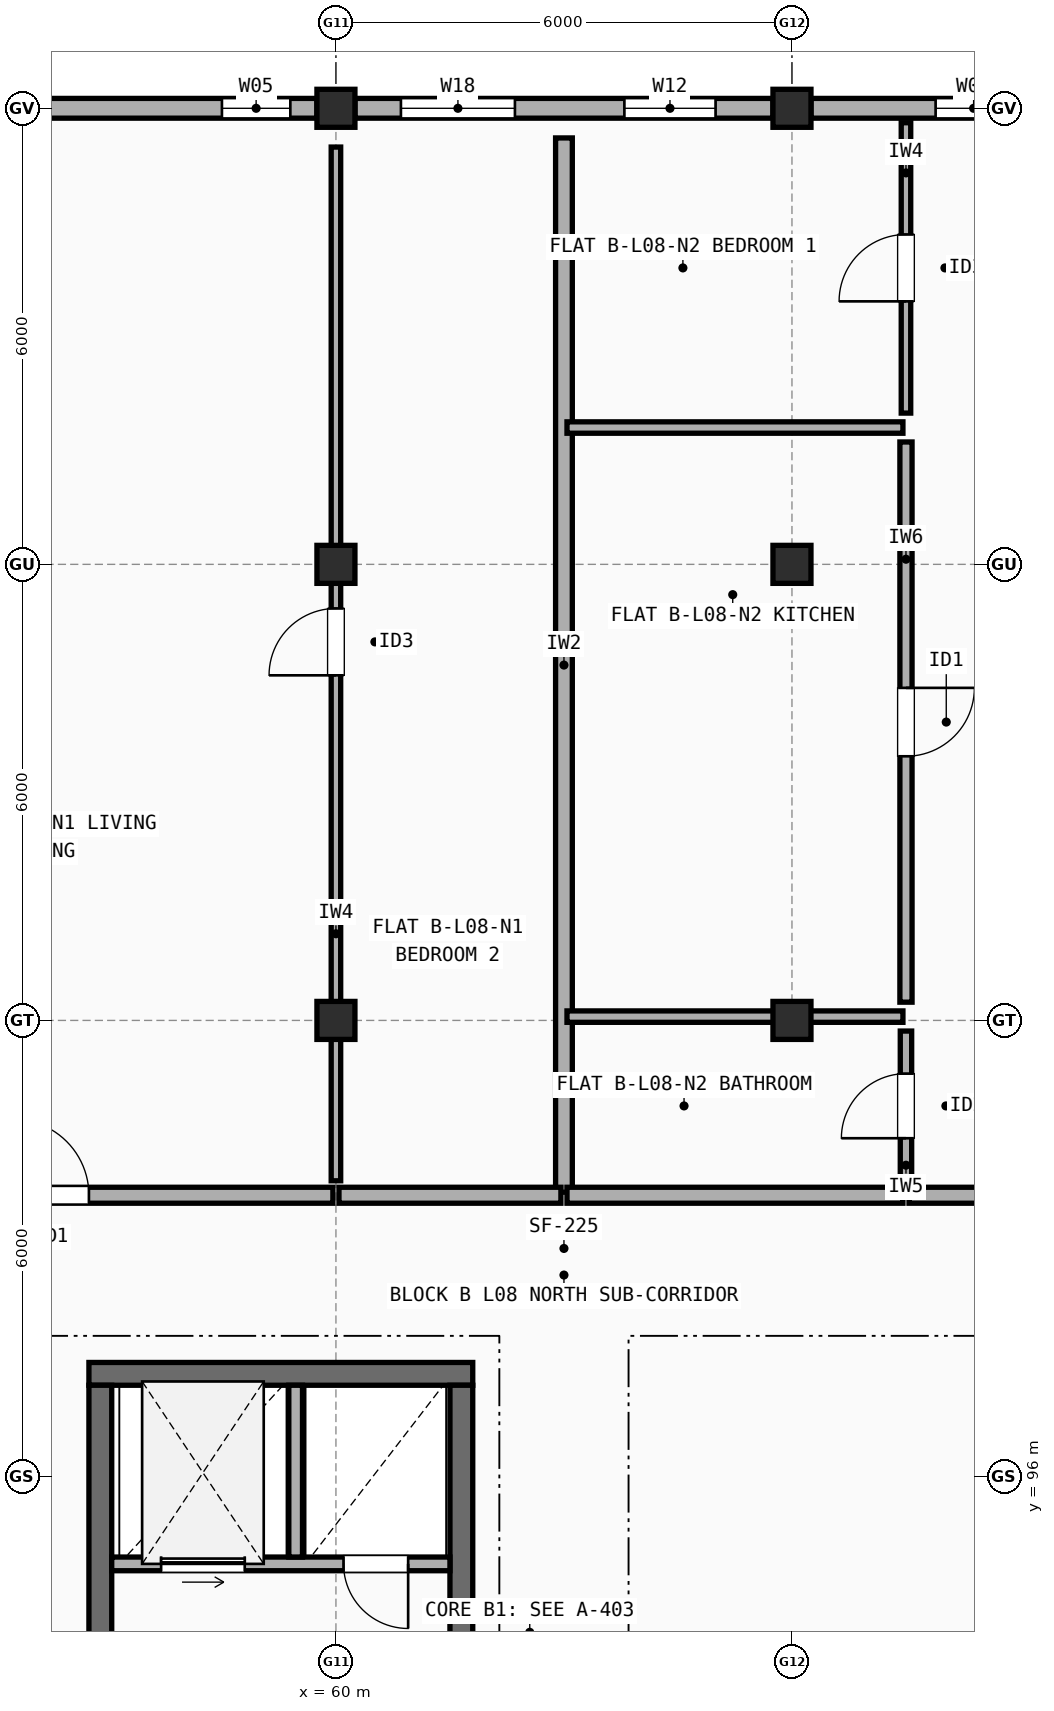
"""IFC4 building model, lengths in metres.
Left out: names, types, materials, properties, quantities, classifications, styles, units other than length and angle.
Written with IfcOpenShell. Run it as: python <this file> out.ifc"""

import sys

from ifc_helpers import new_model, si_unit, direction, frame, frame_2d, origin, origin_2d, place, context, subcontext, project, spatial, rectangle, extrude, element, fill, save


model = new_model("IFC4")
c1 = context("Model", 3, precision=1e-05, world=origin(), true_north=direction((0.0, 1.0)))
c2 = subcontext(c1, "Body", "Model", "MODEL_VIEW")
j1 = project(units=[si_unit("LENGTHUNIT", "METRE"), si_unit("PLANEANGLEUNIT", "RADIAN")], contexts=[c1])
p1 = place(None, origin())
s1 = spatial("IfcSite", under=j1, at=p1, CompositionType="ELEMENT")
p2 = place(p1, origin())
s2 = spatial("IfcBuilding", under=s1, at=p2, CompositionType="ELEMENT")
p3 = place(p2, frame((0.0, 0.0, 26.9)))
s3 = spatial("IfcBuildingStorey", under=s2, at=p3, CompositionType="ELEMENT", Elevation=26.9)
for number, where, z_axis, x_axis in (
    (1, (60.0, 102.0, 0.0), (0.0, 0.0, 1.0), (1.0, 0.0, 0.0)),
    (2, (60.0, 108.0, 0.0), (0.0, 0.0, 1.0), (1.0, 0.0, 0.0)),
    (3, (60.0, 114.0, 0.0), (0.0, 0.0, 1.0), (1.0, 0.0, 0.0)),
    (4, (66.0, 102.0, 0.0), (0.0, 0.0, 1.0), (1.0, 0.0, 0.0)),
    (5, (66.0, 108.0, 0.0), (0.0, 0.0, 1.0), (1.0, 0.0, 0.0)),
    (6, (66.0, 114.0, 0.0), (0.0, 0.0, 1.0), (1.0, 0.0, 0.0)),
):
    element("IfcColumn", number, at=place(p3, frame(where, z_axis=z_axis, x_axis=x_axis)), inside=s3, PredefinedType="COLUMN", context=c2, shape_type="SweptSolid", body=[
        extrude(rectangle(XDim=0.5, YDim=0.5, at=origin_2d()), origin(), (0.0, 0.0, 1.0), 2.98),
    ])
p4 = place(p3, frame((71.75, 114.0, 0.0), z_axis=(0.0, 0.0, 1.0), x_axis=(-1.0, 0.0, 0.0)))
e7 = element("IfcWall", 7, at=p4, inside=s3, PredefinedType="STANDARD", context=c2, shape_type="SweptSolid", body=[
    extrude(rectangle(XDim=5.5, YDim=0.26, at=frame_2d((2.75, 0.0))), origin(), (0.0, 0.0, 1.0), 2.462),
])
p5 = place(p4, frame((0.35, 0.0, 0.9)))
e8 = element("IfcOpeningElement", 8, at=p5, cuts=e7, PredefinedType="OPENING", context=c2, shape_type="SweptSolid", body=[
    extrude(rectangle(XDim=1.0, YDim=1.4, at=frame_2d((0.5, 0.7))), frame((0.0, 0.14, 0.0), z_axis=(0.0, -1.0, 0.0), x_axis=(1.0, 0.0, 0.0)), (0.0, 0.0, 1.0), 0.28),
])
p6 = place(p4, frame((2.86, 0.0, 0.9)))
e9 = element("IfcOpeningElement", 9, at=p6, cuts=e7, PredefinedType="OPENING", context=c2, shape_type="SweptSolid", body=[
    extrude(rectangle(XDim=1.0, YDim=1.4, at=frame_2d((0.5, 0.7))), frame((0.0, 0.14, 0.0), z_axis=(0.0, -1.0, 0.0), x_axis=(1.0, 0.0, 0.0)), (0.0, 0.0, 1.0), 0.28),
])
p7 = place(p3, frame((65.75, 114.0, 0.0), z_axis=(0.0, 0.0, 1.0), x_axis=(-1.0, 0.0, 0.0)))
e10 = element("IfcWall", 10, at=p7, inside=s3, PredefinedType="STANDARD", context=c2, shape_type="SweptSolid", body=[
    extrude(rectangle(XDim=5.5, YDim=0.26, at=frame_2d((2.75, 0.0))), origin(), (0.0, 0.0, 1.0), 2.462),
])
p8 = place(p7, frame((0.755, 0.0, 0.9)))
e11 = element("IfcOpeningElement", 11, at=p8, cuts=e10, PredefinedType="OPENING", context=c2, shape_type="SweptSolid", body=[
    extrude(rectangle(XDim=1.2, YDim=1.35, at=frame_2d((0.6, 0.675))), frame((0.0, 0.14, 0.0), z_axis=(0.0, -1.0, 0.0), x_axis=(1.0, 0.0, 0.0)), (0.0, 0.0, 1.0), 0.28),
])
p9 = place(p7, frame((3.395, 0.0, 0.9)))
e12 = element("IfcOpeningElement", 12, at=p9, cuts=e10, PredefinedType="OPENING", context=c2, shape_type="SweptSolid", body=[
    extrude(rectangle(XDim=1.5, YDim=1.4, at=frame_2d((0.75, 0.7))), frame((0.0, 0.14, 0.0), z_axis=(0.0, -1.0, 0.0), x_axis=(1.0, 0.0, 0.0)), (0.0, 0.0, 1.0), 0.28),
])
p10 = place(p3, frame((59.75, 114.0, 0.0), z_axis=(0.0, 0.0, 1.0), x_axis=(-1.0, 0.0, 0.0)))
e13 = element("IfcWall", 13, at=p10, inside=s3, PredefinedType="STANDARD", context=c2, shape_type="SweptSolid", body=[
    extrude(rectangle(XDim=5.5, YDim=0.26, at=frame_2d((2.75, 0.0))), origin(), (0.0, 0.0, 1.0), 2.462),
])
p11 = place(p10, frame((0.35, 0.0, 0.9)))
e14 = element("IfcOpeningElement", 14, at=p11, cuts=e13, PredefinedType="OPENING", context=c2, shape_type="SweptSolid", body=[
    extrude(rectangle(XDim=0.9, YDim=1.4, at=frame_2d((0.45, 0.7))), frame((0.0, 0.14, 0.0), z_axis=(0.0, -1.0, 0.0), x_axis=(1.0, 0.0, 0.0)), (0.0, 0.0, 1.0), 0.28),
])
p12 = place(p10, frame((4.25, 0.0, 0.9)))
e15 = element("IfcOpeningElement", 15, at=p12, cuts=e13, PredefinedType="OPENING", context=c2, shape_type="SweptSolid", body=[
    extrude(rectangle(XDim=0.9, YDim=1.4, at=frame_2d((0.45, 0.7))), frame((0.0, 0.14, 0.0), z_axis=(0.0, -1.0, 0.0), x_axis=(1.0, 0.0, 0.0)), (0.0, 0.0, 1.0), 0.28),
])
p13 = place(p3, frame((61.8, 97.35, 0.0), z_axis=(0.0, 0.0, 1.0), x_axis=(-1.0, 0.0, 0.0)))
e16 = element("IfcWall", 16, at=p13, inside=s3, PredefinedType="SHEAR", context=c2, shape_type="SweptSolid", body=[
    extrude(rectangle(XDim=5.05, YDim=0.3, at=frame_2d((2.525, 0.0))), origin(), (0.0, 0.0, 1.0), 2.98),
])
p14 = place(p3, frame((61.65, 90.75, 0.0), z_axis=(0.0, 0.0, 1.0), x_axis=(0.0, 1.0, 0.0)))
e17 = element("IfcWall", 17, at=p14, inside=s3, PredefinedType="SHEAR", context=c2, shape_type="SweptSolid", body=[
    extrude(rectangle(XDim=6.45, YDim=0.3, at=frame_2d((3.225, 0.0))), origin(), (0.0, 0.0, 1.0), 2.98),
])
p15 = place(p3, frame((56.9, 93.75, 0.0), z_axis=(0.0, 0.0, 1.0), x_axis=(0.0, 1.0, 0.0)))
e18 = element("IfcWall", 18, at=p15, inside=s3, PredefinedType="SHEAR", context=c2, shape_type="SweptSolid", body=[
    extrude(rectangle(XDim=3.45, YDim=0.3, at=frame_2d((1.725, 0.0))), origin(), (0.0, 0.0, 1.0), 2.98),
])
p16 = place(p3, frame((57.05, 94.85, 0.0), z_axis=(0.0, 0.0, 1.0), x_axis=(1.0, 0.0, 0.0)))
e19 = element("IfcWall", 19, at=p16, inside=s3, PredefinedType="SOLIDWALL", context=c2, shape_type="SweptSolid", body=[
    extrude(rectangle(XDim=4.45, YDim=0.18, at=frame_2d((2.225, 0.0))), origin(), (0.0, 0.0, 1.0), 2.98),
])
p17 = place(p16, frame((0.65, 0.0, 0.0)))
e20 = element("IfcOpeningElement", 20, at=p17, cuts=e19, PredefinedType="OPENING", context=c2, shape_type="SweptSolid", body=[
    extrude(rectangle(XDim=1.1, YDim=2.15, at=frame_2d((0.55, 1.075))), frame((0.0, 0.1, 0.0), z_axis=(0.0, -1.0, 0.0), x_axis=(1.0, 0.0, 0.0)), (0.0, 0.0, 1.0), 0.2),
])
p18 = place(p16, frame((3.05, 0.0, 0.0)))
e21 = element("IfcOpeningElement", 21, at=p18, cuts=e19, PredefinedType="OPENING", context=c2, shape_type="SweptSolid", body=[
    extrude(rectangle(XDim=0.85, YDim=2.1, at=frame_2d((0.425, 1.05))), frame((0.0, 0.1, 0.0), z_axis=(0.0, -1.0, 0.0), x_axis=(1.0, 0.0, 0.0)), (0.0, 0.0, 1.0), 0.2),
])
p19 = place(p3, frame((59.47, 94.94, 0.0), z_axis=(0.0, 0.0, 1.0), x_axis=(0.0, 1.0, 0.0)))
e22 = element("IfcWall", 22, at=p19, inside=s3, PredefinedType="SOLIDWALL", context=c2, shape_type="SweptSolid", body=[
    extrude(rectangle(XDim=2.26, YDim=0.18, at=frame_2d((1.13, 0.0))), origin(), (0.0, 0.0, 1.0), 2.98),
])
p20 = place(p3, frame((63.0, 99.74, 0.0), z_axis=(0.0, 0.0, 1.0), x_axis=(0.0, 1.0, 0.0)))
e23 = element("IfcWall", 23, at=p20, inside=s3, PredefinedType="SOLIDWALL", context=c2, shape_type="SweptSolid", body=[
    extrude(rectangle(XDim=13.87, YDim=0.22, at=frame_2d((6.935, 0.0))), origin(), (0.0, 0.0, 1.0), 2.462),
])
p21 = place(p3, frame((52.54, 99.7, 0.0), z_axis=(0.0, 0.0, 1.0), x_axis=(1.0, 0.0, 0.0)))
e24 = element("IfcWall", 24, at=p21, inside=s3, PredefinedType="SOLIDWALL", context=c2, shape_type="SweptSolid", body=[
    extrude(rectangle(XDim=7.42, YDim=0.21, at=frame_2d((3.71, 0.0))), origin(), (0.0, 0.0, 1.0), 2.508),
])
p22 = place(p21, frame((3.21, 0.0, 0.0)))
e25 = element("IfcOpeningElement", 25, at=p22, cuts=e24, PredefinedType="OPENING", context=c2, shape_type="SweptSolid", body=[
    extrude(rectangle(XDim=1.0, YDim=2.15, at=frame_2d((0.5, 1.075))), frame((0.0, 0.115, 0.0), z_axis=(0.0, -1.0, 0.0), x_axis=(1.0, 0.0, 0.0)), (0.0, 0.0, 1.0), 0.23),
])
p23 = place(p3, frame((60.04, 99.7, 0.0), z_axis=(0.0, 0.0, 1.0), x_axis=(1.0, 0.0, 0.0)))
e26 = element("IfcWall", 26, at=p23, inside=s3, PredefinedType="SOLIDWALL", context=c2, shape_type="SweptSolid", body=[
    extrude(rectangle(XDim=2.92, YDim=0.21, at=frame_2d((1.46, 0.0))), origin(), (0.0, 0.0, 1.0), 2.508),
])
p24 = place(p3, frame((60.0, 99.89, 0.0), z_axis=(0.0, 0.0, 1.0), x_axis=(0.0, 1.0, 0.0)))
e27 = element("IfcWall", 27, at=p24, inside=s3, PredefinedType="PARTITIONING", context=c2, shape_type="SweptSolid", body=[
    extrude(rectangle(XDim=13.6, YDim=0.125, at=frame_2d((6.8, 0.0))), origin(), (0.0, 0.0, 1.0), 2.458),
])
p25 = place(p24, frame((6.65, 0.0, 0.0)))
e28 = element("IfcOpeningElement", 28, at=p25, cuts=e27, PredefinedType="OPENING", context=c2, shape_type="SweptSolid", body=[
    extrude(rectangle(XDim=0.88, YDim=2.1, at=frame_2d((0.44, 1.05))), frame((0.0, 0.073, 0.0), z_axis=(0.0, -1.0, 0.0), x_axis=(1.0, 0.0, 0.0)), (0.0, 0.0, 1.0), 0.145),
])
p26 = place(p3, frame((63.04, 99.7, 0.0), z_axis=(0.0, 0.0, 1.0), x_axis=(1.0, 0.0, 0.0)))
e29 = element("IfcWall", 29, at=p26, inside=s3, PredefinedType="SOLIDWALL", context=c2, shape_type="SweptSolid", body=[
    extrude(rectangle(XDim=4.42, YDim=0.21, at=frame_2d((2.21, 0.0))), origin(), (0.0, 0.0, 1.0), 2.98),
])
p27 = place(p3, frame((67.54, 99.7, 0.0), z_axis=(0.0, 0.0, 1.0), x_axis=(1.0, 0.0, 0.0)))
e30 = element("IfcWall", 30, at=p27, inside=s3, PredefinedType="SOLIDWALL", context=c2, shape_type="SweptSolid", body=[
    extrude(rectangle(XDim=7.42, YDim=0.21, at=frame_2d((3.71, 0.0))), origin(), (0.0, 0.0, 1.0), 2.98),
])
p28 = place(p27, frame((3.185, 0.0, 0.0)))
e31 = element("IfcOpeningElement", 31, at=p28, cuts=e30, PredefinedType="OPENING", context=c2, shape_type="SweptSolid", body=[
    extrude(rectangle(XDim=1.05, YDim=2.15, at=frame_2d((0.525, 1.075))), frame((0.0, 0.115, 0.0), z_axis=(0.0, -1.0, 0.0), x_axis=(1.0, 0.0, 0.0)), (0.0, 0.0, 1.0), 0.23),
])
p29 = place(p3, frame((67.5, 109.99, 0.0), z_axis=(0.0, 0.0, 1.0), x_axis=(0.0, 1.0, 0.0)))
e32 = element("IfcWall", 32, at=p29, inside=s3, PredefinedType="PARTITIONING", context=c2, shape_type="SweptSolid", body=[
    extrude(rectangle(XDim=3.82, YDim=0.125, at=frame_2d((1.91, 0.0))), origin(), (0.0, 0.0, 1.0), 2.98),
])
p30 = place(p29, frame((1.47, 0.0, 0.0)))
e33 = element("IfcOpeningElement", 33, at=p30, cuts=e32, PredefinedType="OPENING", context=c2, shape_type="SweptSolid", body=[
    extrude(rectangle(XDim=0.88, YDim=2.1, at=frame_2d((0.44, 1.05))), frame((0.0, 0.073, 0.0), z_axis=(0.0, -1.0, 0.0), x_axis=(1.0, 0.0, 0.0)), (0.0, 0.0, 1.0), 0.145),
])
p31 = place(p3, frame((67.5, 102.24, 0.0), z_axis=(0.0, 0.0, 1.0), x_axis=(0.0, 1.0, 0.0)))
e34 = element("IfcWall", 34, at=p31, inside=s3, PredefinedType="PLUMBINGWALL", context=c2, shape_type="SweptSolid", body=[
    extrude(rectangle(XDim=7.37, YDim=0.16, at=frame_2d((3.685, 0.0))), origin(), (0.0, 0.0, 1.0), 2.462),
])
p32 = place(p31, frame((3.235, 0.0, 0.0)))
e35 = element("IfcOpeningElement", 35, at=p32, cuts=e34, PredefinedType="OPENING", context=c2, shape_type="SweptSolid", body=[
    extrude(rectangle(XDim=0.9, YDim=2.1, at=frame_2d((0.45, 1.05))), frame((0.0, 0.09, 0.0), z_axis=(0.0, -1.0, 0.0), x_axis=(1.0, 0.0, 0.0)), (0.0, 0.0, 1.0), 0.18),
])
p33 = place(p3, frame((67.5, 99.89, 0.0), z_axis=(0.0, 0.0, 1.0), x_axis=(0.0, 1.0, 0.0)))
e36 = element("IfcWall", 36, at=p33, inside=s3, PredefinedType="PARTITIONING", context=c2, shape_type="SweptSolid", body=[
    extrude(rectangle(XDim=1.97, YDim=0.15, at=frame_2d((0.985, 0.0))), origin(), (0.0, 0.0, 1.0), 2.98),
])
p34 = place(p33, frame((0.56, 0.0, 0.0)))
e37 = element("IfcOpeningElement", 37, at=p34, cuts=e36, PredefinedType="OPENING", context=c2, shape_type="SweptSolid", body=[
    extrude(rectangle(XDim=0.85, YDim=2.1, at=frame_2d((0.425, 1.05))), frame((0.0, 0.085, 0.0), z_axis=(0.0, -1.0, 0.0), x_axis=(1.0, 0.0, 0.0)), (0.0, 0.0, 1.0), 0.17),
])
p35 = place(p3, frame((63.04, 109.8, 0.0), z_axis=(0.0, 0.0, 1.0), x_axis=(1.0, 0.0, 0.0)))
e38 = element("IfcWall", 38, at=p35, inside=s3, PredefinedType="PARTITIONING", context=c2, shape_type="SweptSolid", body=[
    extrude(rectangle(XDim=4.42, YDim=0.15, at=frame_2d((2.21, 0.0))), origin(), (0.0, 0.0, 1.0), 2.548),
])
p36 = place(p3, frame((63.04, 102.05, 0.0), z_axis=(0.0, 0.0, 1.0), x_axis=(1.0, 0.0, 0.0)))
e39 = element("IfcWall", 39, at=p36, inside=s3, PredefinedType="PARTITIONING", context=c2, shape_type="SweptSolid", body=[
    extrude(rectangle(XDim=4.42, YDim=0.15, at=frame_2d((2.21, 0.0))), origin(), (0.0, 0.0, 1.0), 2.462),
])
p37 = place(p6, origin())
e40 = element("IfcWindow", 40, at=p37, inside=s3, PartitioningType="SINGLE_PANEL", PredefinedType="WINDOW", context=c2, shape_type="SweptSolid", body=[
    extrude(rectangle(XDim=1.0, YDim=1.4, at=frame_2d((0.5, 0.7))), frame((0.0, 0.03, 0.0), z_axis=(0.0, -1.0, 0.0), x_axis=(1.0, 0.0, 0.0)), (0.0, 0.0, 1.0), 0.06),
])
fill(e9, e40)
p38 = place(p8, origin())
e41 = element("IfcWindow", 41, at=p38, inside=s3, PartitioningType="SINGLE_PANEL", PredefinedType="WINDOW", context=c2, shape_type="SweptSolid", body=[
    extrude(rectangle(XDim=1.2, YDim=1.35, at=frame_2d((0.6, 0.675))), frame((0.0, 0.03, 0.0), z_axis=(0.0, -1.0, 0.0), x_axis=(1.0, 0.0, 0.0)), (0.0, 0.0, 1.0), 0.06),
])
fill(e11, e41)
p39 = place(p9, origin())
e42 = element("IfcWindow", 42, at=p39, inside=s3, PartitioningType="SINGLE_PANEL", PredefinedType="WINDOW", context=c2, shape_type="SweptSolid", body=[
    extrude(rectangle(XDim=1.5, YDim=1.4, at=frame_2d((0.75, 0.7))), frame((0.0, 0.03, 0.0), z_axis=(0.0, -1.0, 0.0), x_axis=(1.0, 0.0, 0.0)), (0.0, 0.0, 1.0), 0.06),
])
fill(e12, e42)
p40 = place(p11, origin())
e43 = element("IfcWindow", 43, at=p40, inside=s3, PartitioningType="SINGLE_PANEL", PredefinedType="WINDOW", context=c2, shape_type="SweptSolid", body=[
    extrude(rectangle(XDim=0.9, YDim=1.4, at=frame_2d((0.45, 0.7))), frame((0.0, 0.03, 0.0), z_axis=(0.0, -1.0, 0.0), x_axis=(1.0, 0.0, 0.0)), (0.0, 0.0, 1.0), 0.06),
])
fill(e14, e43)
p41 = place(p17, origin())
e44 = element("IfcDoor", 44, at=p41, inside=s3, OperationType="SLIDING_TO_LEFT", PredefinedType="DOOR", context=c2, shape_type="SweptSolid", body=[
    extrude(rectangle(XDim=1.1, YDim=2.15, at=frame_2d((0.55, 1.075))), frame((0.0, 0.025, 0.0), z_axis=(0.0, -1.0, 0.0), x_axis=(1.0, 0.0, 0.0)), (0.0, 0.0, 1.0), 0.05),
])
fill(e20, e44)
p42 = place(p18, frame((0.85, 0.0, 0.0), z_axis=(0.0, 0.0, 1.0), x_axis=(-1.0, 0.0, 0.0)))
e45 = element("IfcDoor", 45, at=p42, inside=s3, OperationType="SINGLE_SWING_RIGHT", PredefinedType="DOOR", context=c2, shape_type="SweptSolid", body=[
    extrude(rectangle(XDim=0.85, YDim=2.1, at=frame_2d((0.425, 1.05))), frame((0.0, 0.025, 0.0), z_axis=(0.0, -1.0, 0.0), x_axis=(1.0, 0.0, 0.0)), (0.0, 0.0, 1.0), 0.05),
])
fill(e21, e45)
p43 = place(p22, origin())
e46 = element("IfcDoor", 46, at=p43, inside=s3, OperationType="SINGLE_SWING_LEFT", PredefinedType="DOOR", context=c2, shape_type="SweptSolid", body=[
    extrude(rectangle(XDim=1.0, YDim=2.15, at=frame_2d((0.5, 1.075))), frame((0.0, 0.025, 0.0), z_axis=(0.0, -1.0, 0.0), x_axis=(1.0, 0.0, 0.0)), (0.0, 0.0, 1.0), 0.05),
])
fill(e25, e46)
p44 = place(p25, origin())
e47 = element("IfcDoor", 47, at=p44, inside=s3, OperationType="SINGLE_SWING_LEFT", PredefinedType="DOOR", context=c2, shape_type="SweptSolid", body=[
    extrude(rectangle(XDim=0.88, YDim=2.1, at=frame_2d((0.44, 1.05))), frame((0.0, 0.025, 0.0), z_axis=(0.0, -1.0, 0.0), x_axis=(1.0, 0.0, 0.0)), (0.0, 0.0, 1.0), 0.05),
])
fill(e28, e47)
p45 = place(p30, origin())
e48 = element("IfcDoor", 48, at=p45, inside=s3, OperationType="SINGLE_SWING_LEFT", PredefinedType="DOOR", context=c2, shape_type="SweptSolid", body=[
    extrude(rectangle(XDim=0.88, YDim=2.1, at=frame_2d((0.44, 1.05))), frame((0.0, 0.025, 0.0), z_axis=(0.0, -1.0, 0.0), x_axis=(1.0, 0.0, 0.0)), (0.0, 0.0, 1.0), 0.05),
])
fill(e33, e48)
p46 = place(p32, origin())
e49 = element("IfcDoor", 49, at=p46, inside=s3, OperationType="SINGLE_SWING_RIGHT", PredefinedType="DOOR", context=c2, shape_type="SweptSolid", body=[
    extrude(rectangle(XDim=0.9, YDim=2.1, at=frame_2d((0.45, 1.05))), frame((0.0, 0.025, 0.0), z_axis=(0.0, -1.0, 0.0), x_axis=(1.0, 0.0, 0.0)), (0.0, 0.0, 1.0), 0.05),
])
fill(e35, e49)
p47 = place(p34, origin())
e50 = element("IfcDoor", 50, at=p47, inside=s3, OperationType="SINGLE_SWING_LEFT", PredefinedType="DOOR", context=c2, shape_type="SweptSolid", body=[
    extrude(rectangle(XDim=0.85, YDim=2.1, at=frame_2d((0.425, 1.05))), frame((0.0, 0.025, 0.0), z_axis=(0.0, -1.0, 0.0), x_axis=(1.0, 0.0, 0.0)), (0.0, 0.0, 1.0), 0.05),
])
fill(e37, e50)
save(model, sys.argv[1])
